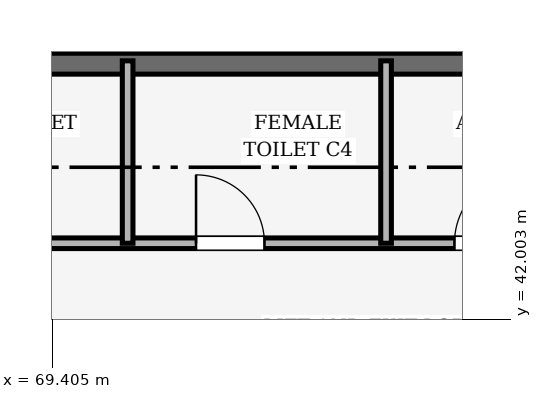
"""IFC4 building model, lengths in metres.
Left out: names, types, materials, properties, quantities, classifications, styles, units other than length and angle.
Written with IfcOpenShell. Run it as: python <this file> out.ifc"""

import sys

from ifc_helpers import new_model, si_unit, direction, frame, frame_2d, origin, place, context, subcontext, project, spatial, rectangle, extrude, element, fill, save


model = new_model("IFC4")
c1 = context("Model", 3, precision=1e-05, world=origin(), true_north=direction((0.0, 1.0)))
c2 = subcontext(c1, "Body", "Model", "MODEL_VIEW")
j1 = project(units=[si_unit("LENGTHUNIT", "METRE"), si_unit("PLANEANGLEUNIT", "RADIAN")], contexts=[c1])
p1 = place(None, origin())
s1 = spatial("IfcSite", under=j1, at=p1, CompositionType="ELEMENT")
p2 = place(p1, origin())
s2 = spatial("IfcBuilding", under=s1, at=p2, CompositionType="ELEMENT")
p3 = place(p2, origin())
s3 = spatial("IfcBuildingStorey", under=s2, at=p3, CompositionType="ELEMENT", Elevation=0.0)
p4 = place(p3, frame((77.2, 45.4, 0.0), z_axis=(0.0, 0.0, 1.0), x_axis=(-1.0, 0.0, 0.0)))
e1 = element("IfcWall", 1, at=p4, inside=s3, PredefinedType="SHEAR", context=c2, shape_type="SweptSolid", body=[
    extrude(rectangle(XDim=10.2, YDim=0.35, at=frame_2d((5.1, 0.0))), origin(), (0.0, 0.0, 1.0), 5.4),
])
p5 = place(p3, frame((67.0, 43.0, 0.0), z_axis=(0.0, 0.0, 1.0), x_axis=(1.0, 0.0, 0.0)))
e2 = element("IfcWall", 2, at=p5, inside=s3, PredefinedType="PARTITIONING", context=c2, shape_type="SweptSolid", body=[
    extrude(rectangle(XDim=10.2, YDim=0.14, at=frame_2d((5.1, 0.0))), origin(), (0.0, 0.0, 1.0), 4.5),
])
p6 = place(p5, frame((0.9, 0.0, 0.0)))
e3 = element("IfcOpeningElement", 3, at=p6, cuts=e2, PredefinedType="OPENING", context=c2, shape_type="SweptSolid", body=[
    extrude(rectangle(XDim=0.9, YDim=2.1, at=frame_2d((0.45, 1.05))), frame((0.0, 0.08, 0.0), z_axis=(0.0, -1.0, 0.0), x_axis=(1.0, 0.0, 0.0)), (0.0, 0.0, 1.0), 0.16),
])
p7 = place(p5, frame((4.3, 0.0, 0.0)))
e4 = element("IfcOpeningElement", 4, at=p7, cuts=e2, PredefinedType="OPENING", context=c2, shape_type="SweptSolid", body=[
    extrude(rectangle(XDim=0.9, YDim=2.1, at=frame_2d((0.45, 1.05))), frame((0.0, 0.08, 0.0), z_axis=(0.0, -1.0, 0.0), x_axis=(1.0, 0.0, 0.0)), (0.0, 0.0, 1.0), 0.16),
])
p8 = place(p5, frame((7.7, 0.0, 0.0)))
e5 = element("IfcOpeningElement", 5, at=p8, cuts=e2, PredefinedType="OPENING", context=c2, shape_type="SweptSolid", body=[
    extrude(rectangle(XDim=0.95, YDim=2.1, at=frame_2d((0.475, 1.05))), frame((0.0, 0.08, 0.0), z_axis=(0.0, -1.0, 0.0), x_axis=(1.0, 0.0, 0.0)), (0.0, 0.0, 1.0), 0.16),
])
for number, where, z_axis, x_axis in (
    (6, (70.4, 43.0, 0.0), (0.0, 0.0, 1.0), (0.0, 1.0, 0.0)),
    (7, (73.8, 43.0, 0.0), (0.0, 0.0, 1.0), (0.0, 1.0, 0.0)),
):
    element("IfcWall", number, at=place(p3, frame(where, z_axis=z_axis, x_axis=x_axis)), inside=s3, PredefinedType="PARTITIONING", context=c2, shape_type="SweptSolid", body=[
        extrude(rectangle(XDim=2.4, YDim=0.14, at=frame_2d((1.2, 0.0))), origin(), (0.0, 0.0, 1.0), 4.5),
    ])
p9 = place(p7, origin())
e8 = element("IfcDoor", 8, at=p9, inside=s3, OperationType="SINGLE_SWING_LEFT", PredefinedType="DOOR", context=c2, shape_type="SweptSolid", body=[
    extrude(rectangle(XDim=0.9, YDim=2.1, at=frame_2d((0.45, 1.05))), frame((0.0, 0.025, 0.0), z_axis=(0.0, -1.0, 0.0), x_axis=(1.0, 0.0, 0.0)), (0.0, 0.0, 1.0), 0.05),
])
fill(e4, e8)
p10 = place(p8, origin())
e9 = element("IfcDoor", 9, at=p10, inside=s3, OperationType="SINGLE_SWING_RIGHT", PredefinedType="DOOR", context=c2, shape_type="SweptSolid", body=[
    extrude(rectangle(XDim=0.95, YDim=2.1, at=frame_2d((0.475, 1.05))), frame((0.0, 0.025, 0.0), z_axis=(0.0, -1.0, 0.0), x_axis=(1.0, 0.0, 0.0)), (0.0, 0.0, 1.0), 0.05),
])
fill(e5, e9)
save(model, sys.argv[1])
